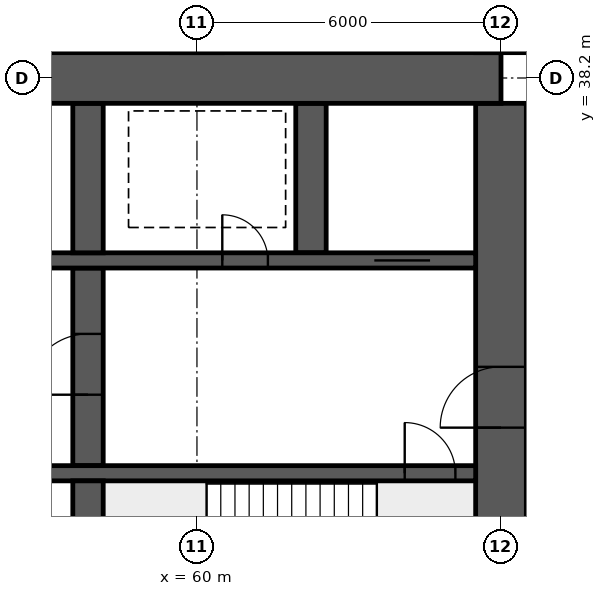
"""IFC4 building model, lengths in metres.
Left out: names, types, materials, properties, quantities, classifications, styles, units other than length and angle.
Written with IfcOpenShell. Run it as: python <this file> out.ifc"""

import sys

from ifc_helpers import new_model, si_unit, direction, frame, frame_2d, origin, place, context, subcontext, project, spatial, rectangle, extrude, element, fill, save


model = new_model("IFC4")
c1 = context("Model", 3, precision=1e-05, world=origin(), true_north=direction((0.0, 1.0)))
c2 = subcontext(c1, "Body", "Model", "MODEL_VIEW")
j1 = project(units=[si_unit("LENGTHUNIT", "METRE"), si_unit("PLANEANGLEUNIT", "RADIAN")], contexts=[c1])
p1 = place(None, origin())
s1 = spatial("IfcSite", under=j1, at=p1, CompositionType="ELEMENT")
p2 = place(p1, origin())
s2 = spatial("IfcBuilding", under=s1, at=p2, CompositionType="ELEMENT")
p3 = place(p2, frame((0.0, 0.0, -4.5)))
s3 = spatial("IfcBuildingStorey", under=s2, at=p3, CompositionType="ELEMENT", Elevation=-4.5)
p4 = place(p3, frame((18.0, 38.2, 0.0), z_axis=(0.0, 0.0, 1.0), x_axis=(1.0, 0.0, 0.0)))
e1 = element("IfcWall", 1, at=p4, inside=s3, PredefinedType="SHEAR", context=c2, shape_type="SweptSolid", body=[
    extrude(rectangle(XDim=48.0, YDim=1.0, at=frame_2d((24.0, 0.0))), origin(), (0.0, 0.0, 1.0), 4.5),
])
p5 = place(p3, frame((66.0, 26.3, 0.0), z_axis=(0.0, 0.0, 1.0), x_axis=(0.0, 1.0, 0.0)))
e2 = element("IfcWall", 2, at=p5, inside=s3, PredefinedType="SHEAR", context=c2, shape_type="SweptSolid", body=[
    extrude(rectangle(XDim=11.4, YDim=1.0, at=frame_2d((5.7, 0.0))), origin(), (0.0, 0.0, 1.0), 4.5),
])
p6 = place(p5, frame((5.0, 0.0, 0.0)))
e3 = element("IfcOpeningElement", 3, at=p6, cuts=e2, PredefinedType="OPENING", context=c2, shape_type="SweptSolid", body=[
    extrude(rectangle(XDim=1.2, YDim=2.1, at=frame_2d((0.6, 1.05))), frame((0.0, 0.51, 0.0), z_axis=(0.0, -1.0, 0.0), x_axis=(1.0, 0.0, 0.0)), (0.0, 0.0, 1.0), 1.02),
])
p7 = place(p3, frame((18.5, 30.4, 0.0), z_axis=(0.0, 0.0, 1.0), x_axis=(1.0, 0.0, 0.0)))
e4 = element("IfcWall", 4, at=p7, inside=s3, PredefinedType="SHEAR", context=c2, shape_type="SweptSolid", body=[
    extrude(rectangle(XDim=47.0, YDim=0.3, at=frame_2d((23.5, 0.0))), origin(), (0.0, 0.0, 1.0), 4.5),
])
p8 = place(p7, frame((0.4, 0.0, 0.0)))
e5 = element("IfcOpeningElement", 5, at=p8, cuts=e4, PredefinedType="OPENING", context=c2, shape_type="SweptSolid", body=[
    extrude(rectangle(XDim=1.0, YDim=2.1, at=frame_2d((0.5, 1.05))), frame((0.0, 0.16, 0.0), z_axis=(0.0, -1.0, 0.0), x_axis=(1.0, 0.0, 0.0)), (0.0, 0.0, 1.0), 0.32),
])
p9 = place(p7, frame((45.6, 0.0, 0.0)))
e6 = element("IfcOpeningElement", 6, at=p9, cuts=e4, PredefinedType="OPENING", context=c2, shape_type="SweptSolid", body=[
    extrude(rectangle(XDim=1.0, YDim=2.1, at=frame_2d((0.5, 1.05))), frame((0.0, 0.16, 0.0), z_axis=(0.0, -1.0, 0.0), x_axis=(1.0, 0.0, 0.0)), (0.0, 0.0, 1.0), 0.32),
])
p10 = place(p7, frame((30.117, 0.0, 0.0)))
e7 = element("IfcOpeningElement", 7, at=p10, cuts=e4, PredefinedType="OPENING", context=c2, shape_type="SweptSolid", body=[
    extrude(rectangle(XDim=1.1, YDim=2.1, at=frame_2d((0.55, 1.05))), frame((0.0, 0.16, 0.0), z_axis=(0.0, -1.0, 0.0), x_axis=(1.0, 0.0, 0.0)), (0.0, 0.0, 1.0), 0.32),
])
p11 = place(p7, frame((33.65, 0.0, 0.0)))
e8 = element("IfcOpeningElement", 8, at=p11, cuts=e4, PredefinedType="OPENING", context=c2, shape_type="SweptSolid", body=[
    extrude(rectangle(XDim=1.1, YDim=2.1, at=frame_2d((0.55, 1.05))), frame((0.0, 0.16, 0.0), z_axis=(0.0, -1.0, 0.0), x_axis=(1.0, 0.0, 0.0)), (0.0, 0.0, 1.0), 0.32),
])
p12 = place(p7, frame((37.183, 0.0, 0.0)))
e9 = element("IfcOpeningElement", 9, at=p12, cuts=e4, PredefinedType="OPENING", context=c2, shape_type="SweptSolid", body=[
    extrude(rectangle(XDim=1.1, YDim=2.1, at=frame_2d((0.55, 1.05))), frame((0.0, 0.16, 0.0), z_axis=(0.0, -1.0, 0.0), x_axis=(1.0, 0.0, 0.0)), (0.0, 0.0, 1.0), 0.32),
])
p13 = place(p3, frame((18.5, 34.6, 0.0), z_axis=(0.0, 0.0, 1.0), x_axis=(1.0, 0.0, 0.0)))
e10 = element("IfcWall", 10, at=p13, inside=s3, PredefinedType="SHEAR", context=c2, shape_type="SweptSolid", body=[
    extrude(rectangle(XDim=47.0, YDim=0.3, at=frame_2d((23.5, 0.0))), origin(), (0.0, 0.0, 1.0), 4.5),
])
p14 = place(p13, frame((0.9, 0.0, 0.0)))
e11 = element("IfcOpeningElement", 11, at=p14, cuts=e10, PredefinedType="OPENING", context=c2, shape_type="SweptSolid", body=[
    extrude(rectangle(XDim=1.1, YDim=2.1, at=frame_2d((0.55, 1.05))), frame((0.0, 0.16, 0.0), z_axis=(0.0, -1.0, 0.0), x_axis=(1.0, 0.0, 0.0)), (0.0, 0.0, 1.0), 0.32),
])
p15 = place(p13, frame((45.0, 0.0, 0.0)))
e12 = element("IfcOpeningElement", 12, at=p15, cuts=e10, PredefinedType="OPENING", context=c2, shape_type="SweptSolid", body=[
    extrude(rectangle(XDim=1.1, YDim=2.1, at=frame_2d((0.55, 1.05))), frame((0.0, 0.16, 0.0), z_axis=(0.0, -1.0, 0.0), x_axis=(1.0, 0.0, 0.0)), (0.0, 0.0, 1.0), 0.32),
])
p16 = place(p13, frame((4.1, 0.0, 0.0)))
e13 = element("IfcOpeningElement", 13, at=p16, cuts=e10, PredefinedType="OPENING", context=c2, shape_type="SweptSolid", body=[
    extrude(rectangle(XDim=0.9, YDim=2.1, at=frame_2d((0.45, 1.05))), frame((0.0, 0.16, 0.0), z_axis=(0.0, -1.0, 0.0), x_axis=(1.0, 0.0, 0.0)), (0.0, 0.0, 1.0), 0.32),
])
p17 = place(p13, frame((42.0, 0.0, 0.0)))
e14 = element("IfcOpeningElement", 14, at=p17, cuts=e10, PredefinedType="OPENING", context=c2, shape_type="SweptSolid", body=[
    extrude(rectangle(XDim=0.9, YDim=2.1, at=frame_2d((0.45, 1.05))), frame((0.0, 0.16, 0.0), z_axis=(0.0, -1.0, 0.0), x_axis=(1.0, 0.0, 0.0)), (0.0, 0.0, 1.0), 0.32),
])
p18 = place(p13, frame((8.875, 0.0, 0.0)))
e15 = element("IfcOpeningElement", 15, at=p18, cuts=e10, PredefinedType="OPENING", context=c2, shape_type="SweptSolid", body=[
    extrude(rectangle(XDim=0.9, YDim=2.1, at=frame_2d((0.45, 1.05))), frame((0.0, 0.16, 0.0), z_axis=(0.0, -1.0, 0.0), x_axis=(1.0, 0.0, 0.0)), (0.0, 0.0, 1.0), 0.32),
])
p19 = place(p13, frame((12.849, 0.0, 0.0)))
e16 = element("IfcOpeningElement", 16, at=p19, cuts=e10, PredefinedType="OPENING", context=c2, shape_type="SweptSolid", body=[
    extrude(rectangle(XDim=0.9, YDim=2.1, at=frame_2d((0.45, 1.05))), frame((0.0, 0.16, 0.0), z_axis=(0.0, -1.0, 0.0), x_axis=(1.0, 0.0, 0.0)), (0.0, 0.0, 1.0), 0.32),
])
p20 = place(p13, frame((16.496, 0.0, 0.0)))
e17 = element("IfcOpeningElement", 17, at=p20, cuts=e10, PredefinedType="OPENING", context=c2, shape_type="SweptSolid", body=[
    extrude(rectangle(XDim=0.9, YDim=2.1, at=frame_2d((0.45, 1.05))), frame((0.0, 0.16, 0.0), z_axis=(0.0, -1.0, 0.0), x_axis=(1.0, 0.0, 0.0)), (0.0, 0.0, 1.0), 0.32),
])
p21 = place(p13, frame((20.255, 0.0, 0.0)))
e18 = element("IfcOpeningElement", 18, at=p21, cuts=e10, PredefinedType="OPENING", context=c2, shape_type="SweptSolid", body=[
    extrude(rectangle(XDim=0.9, YDim=2.1, at=frame_2d((0.45, 1.05))), frame((0.0, 0.16, 0.0), z_axis=(0.0, -1.0, 0.0), x_axis=(1.0, 0.0, 0.0)), (0.0, 0.0, 1.0), 0.32),
])
p22 = place(p13, frame((24.661, 0.0, 0.0)))
e19 = element("IfcOpeningElement", 19, at=p22, cuts=e10, PredefinedType="OPENING", context=c2, shape_type="SweptSolid", body=[
    extrude(rectangle(XDim=0.9, YDim=2.1, at=frame_2d((0.45, 1.05))), frame((0.0, 0.16, 0.0), z_axis=(0.0, -1.0, 0.0), x_axis=(1.0, 0.0, 0.0)), (0.0, 0.0, 1.0), 0.32),
])
p23 = place(p13, frame((27.458, 0.0, 0.0)))
e20 = element("IfcOpeningElement", 20, at=p23, cuts=e10, PredefinedType="OPENING", context=c2, shape_type="SweptSolid", body=[
    extrude(rectangle(XDim=0.9, YDim=2.1, at=frame_2d((0.45, 1.05))), frame((0.0, 0.16, 0.0), z_axis=(0.0, -1.0, 0.0), x_axis=(1.0, 0.0, 0.0)), (0.0, 0.0, 1.0), 0.32),
])
p24 = place(p13, frame((30.641, 0.0, 0.0)))
e21 = element("IfcOpeningElement", 21, at=p24, cuts=e10, PredefinedType="OPENING", context=c2, shape_type="SweptSolid", body=[
    extrude(rectangle(XDim=0.9, YDim=2.1, at=frame_2d((0.45, 1.05))), frame((0.0, 0.16, 0.0), z_axis=(0.0, -1.0, 0.0), x_axis=(1.0, 0.0, 0.0)), (0.0, 0.0, 1.0), 0.32),
])
p25 = place(p13, frame((34.592, 0.0, 0.0)))
e22 = element("IfcOpeningElement", 22, at=p25, cuts=e10, PredefinedType="OPENING", context=c2, shape_type="SweptSolid", body=[
    extrude(rectangle(XDim=0.9, YDim=2.1, at=frame_2d((0.45, 1.05))), frame((0.0, 0.16, 0.0), z_axis=(0.0, -1.0, 0.0), x_axis=(1.0, 0.0, 0.0)), (0.0, 0.0, 1.0), 0.32),
])
p26 = place(p13, frame((37.53, 0.0, 0.0)))
e23 = element("IfcOpeningElement", 23, at=p26, cuts=e10, PredefinedType="OPENING", context=c2, shape_type="SweptSolid", body=[
    extrude(rectangle(XDim=0.9, YDim=2.1, at=frame_2d((0.45, 1.05))), frame((0.0, 0.16, 0.0), z_axis=(0.0, -1.0, 0.0), x_axis=(1.0, 0.0, 0.0)), (0.0, 0.0, 1.0), 0.32),
])
p27 = place(p3, frame((57.85, 26.3, 0.0), z_axis=(0.0, 0.0, 1.0), x_axis=(0.0, 1.0, 0.0)))
e24 = element("IfcWall", 24, at=p27, inside=s3, PredefinedType="SHEAR", context=c2, shape_type="SweptSolid", body=[
    extrude(rectangle(XDim=3.95, YDim=0.6, at=frame_2d((1.975, 0.0))), origin(), (0.0, 0.0, 1.0), 4.5),
])
p28 = place(p3, frame((57.85, 30.55, 0.0), z_axis=(0.0, 0.0, 1.0), x_axis=(0.0, 1.0, 0.0)))
e25 = element("IfcWall", 25, at=p28, inside=s3, PredefinedType="SHEAR", context=c2, shape_type="SweptSolid", body=[
    extrude(rectangle(XDim=3.9, YDim=0.6, at=frame_2d((1.95, 0.0))), origin(), (0.0, 0.0, 1.0), 4.5),
])
p29 = place(p28, frame((1.4, 0.0, 0.0)))
e26 = element("IfcOpeningElement", 26, at=p29, cuts=e25, PredefinedType="OPENING", context=c2, shape_type="SweptSolid", body=[
    extrude(rectangle(XDim=1.2, YDim=2.1, at=frame_2d((0.6, 1.05))), frame((0.0, 0.31, 0.0), z_axis=(0.0, -1.0, 0.0), x_axis=(1.0, 0.0, 0.0)), (0.0, 0.0, 1.0), 0.62),
])
for number, where, z_axis, x_axis in (
    (27, (62.25, 34.75, 0.0), (0.0, 0.0, 1.0), (0.0, 1.0, 0.0)),
    (28, (57.85, 34.75, 0.0), (0.0, 0.0, 1.0), (0.0, 1.0, 0.0)),
):
    element("IfcWall", number, at=place(p3, frame(where, z_axis=z_axis, x_axis=x_axis)), inside=s3, PredefinedType="SHEAR", context=c2, shape_type="SweptSolid", body=[
        extrude(rectangle(XDim=2.95, YDim=0.6, at=frame_2d((1.475, 0.0))), origin(), (0.0, 0.0, 1.0), 4.5),
    ])
p30 = place(p6, origin())
e29 = element("IfcDoor", 29, at=p30, inside=s3, OperationType="SINGLE_SWING_LEFT", PredefinedType="DOOR", context=c2, shape_type="SweptSolid", body=[
    extrude(rectangle(XDim=1.2, YDim=2.1, at=frame_2d((0.6, 1.05))), frame((0.0, 0.025, 0.0), z_axis=(0.0, -1.0, 0.0), x_axis=(1.0, 0.0, 0.0)), (0.0, 0.0, 1.0), 0.05),
])
fill(e3, e29)
p31 = place(p9, origin())
e30 = element("IfcDoor", 30, at=p31, inside=s3, OperationType="SINGLE_SWING_LEFT", PredefinedType="DOOR", context=c2, shape_type="SweptSolid", body=[
    extrude(rectangle(XDim=1.0, YDim=2.1, at=frame_2d((0.5, 1.05))), frame((0.0, 0.025, 0.0), z_axis=(0.0, -1.0, 0.0), x_axis=(1.0, 0.0, 0.0)), (0.0, 0.0, 1.0), 0.05),
])
fill(e6, e30)
p32 = place(p15, origin())
e31 = element("IfcDoor", 31, at=p32, inside=s3, OperationType="DOUBLE_DOOR_SLIDING", PredefinedType="DOOR", context=c2, shape_type="SweptSolid", body=[
    extrude(rectangle(XDim=1.1, YDim=2.1, at=frame_2d((0.55, 1.05))), frame((0.0, 0.025, 0.0), z_axis=(0.0, -1.0, 0.0), x_axis=(1.0, 0.0, 0.0)), (0.0, 0.0, 1.0), 0.05),
])
fill(e12, e31)
p33 = place(p17, origin())
e32 = element("IfcDoor", 32, at=p33, inside=s3, OperationType="SINGLE_SWING_LEFT", PredefinedType="DOOR", context=c2, shape_type="SweptSolid", body=[
    extrude(rectangle(XDim=0.9, YDim=2.1, at=frame_2d((0.45, 1.05))), frame((0.0, 0.025, 0.0), z_axis=(0.0, -1.0, 0.0), x_axis=(1.0, 0.0, 0.0)), (0.0, 0.0, 1.0), 0.05),
])
fill(e14, e32)
p34 = place(p29, origin())
e33 = element("IfcDoor", 33, at=p34, inside=s3, OperationType="SINGLE_SWING_LEFT", PredefinedType="DOOR", context=c2, shape_type="SweptSolid", body=[
    extrude(rectangle(XDim=1.2, YDim=2.1, at=frame_2d((0.6, 1.05))), frame((0.0, 0.025, 0.0), z_axis=(0.0, -1.0, 0.0), x_axis=(1.0, 0.0, 0.0)), (0.0, 0.0, 1.0), 0.05),
])
fill(e26, e33)
save(model, sys.argv[1])
